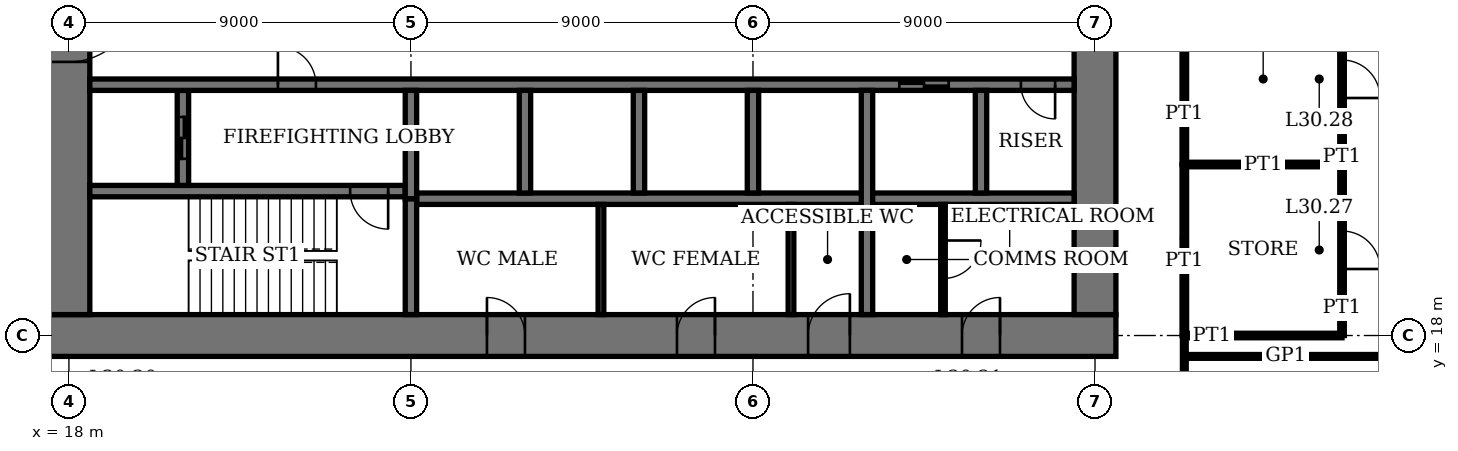
"""IFC4 building model, lengths in metres.
Left out: names, types, materials, properties, quantities, classifications, styles, units other than length and angle.
Written with IfcOpenShell. Run it as: python <this file> out.ifc"""

import sys

from ifc_helpers import new_model, si_unit, direction, frame, frame_2d, origin, place, context, subcontext, project, spatial, rectangle, extrude, element, fill, save


model = new_model("IFC4")
c1 = context("Model", 3, precision=1e-05, world=origin(), true_north=direction((0.0, 1.0)))
c2 = subcontext(c1, "Body", "Model", "MODEL_VIEW")
j1 = project(units=[si_unit("LENGTHUNIT", "METRE"), si_unit("PLANEANGLEUNIT", "RADIAN")], contexts=[c1])
p1 = place(None, origin())
s1 = spatial("IfcSite", under=j1, at=p1, CompositionType="ELEMENT")
p2 = place(p1, origin())
s2 = spatial("IfcBuilding", under=s1, at=p2, CompositionType="ELEMENT")
p3 = place(p2, frame((0.0, 0.0, 125.0)))
s3 = spatial("IfcBuildingStorey", under=s2, at=p3, CompositionType="ELEMENT", Elevation=125.0)
p4 = place(p3, frame((17.45, 18.0, 0.0), z_axis=(0.0, 0.0, 1.0), x_axis=(1.0, 0.0, 0.0)))
e1 = element("IfcWall", 1, at=p4, inside=s3, PredefinedType="SHEAR", context=c2, shape_type="SweptSolid", body=[
    extrude(rectangle(XDim=28.1, YDim=1.1, at=frame_2d((14.05, 0.0))), origin(), (0.0, 0.0, 1.0), 4.0),
])
p5 = place(p4, frame((11.55, 0.0, 0.0)))
e2 = element("IfcOpeningElement", 2, at=p5, cuts=e1, PredefinedType="OPENING", context=c2, shape_type="SweptSolid", body=[
    extrude(rectangle(XDim=1.0, YDim=2.4, at=frame_2d((0.5, 1.2))), frame((0.0, 0.56, 0.0), z_axis=(0.0, -1.0, 0.0), x_axis=(1.0, 0.0, 0.0)), (0.0, 0.0, 1.0), 1.12),
])
p6 = place(p4, frame((16.55, 0.0, 0.0)))
e3 = element("IfcOpeningElement", 3, at=p6, cuts=e1, PredefinedType="OPENING", context=c2, shape_type="SweptSolid", body=[
    extrude(rectangle(XDim=1.0, YDim=2.4, at=frame_2d((0.5, 1.2))), frame((0.0, 0.56, 0.0), z_axis=(0.0, -1.0, 0.0), x_axis=(1.0, 0.0, 0.0)), (0.0, 0.0, 1.0), 1.12),
])
p7 = place(p4, frame((20.0, 0.0, 0.0)))
e4 = element("IfcOpeningElement", 4, at=p7, cuts=e1, PredefinedType="OPENING", context=c2, shape_type="SweptSolid", body=[
    extrude(rectangle(XDim=1.1, YDim=2.4, at=frame_2d((0.55, 1.2))), frame((0.0, 0.56, 0.0), z_axis=(0.0, -1.0, 0.0), x_axis=(1.0, 0.0, 0.0)), (0.0, 0.0, 1.0), 1.12),
])
p8 = place(p4, frame((24.05, 0.0, 0.0)))
e5 = element("IfcOpeningElement", 5, at=p8, cuts=e1, PredefinedType="OPENING", context=c2, shape_type="SweptSolid", body=[
    extrude(rectangle(XDim=1.0, YDim=2.4, at=frame_2d((0.5, 1.2))), frame((0.0, 0.56, 0.0), z_axis=(0.0, -1.0, 0.0), x_axis=(1.0, 0.0, 0.0)), (0.0, 0.0, 1.0), 1.12),
])
p9 = place(p3, frame((18.0, 35.45, 0.0), z_axis=(0.0, 0.0, 1.0), x_axis=(0.0, -1.0, 0.0)))
e6 = element("IfcWall", 6, at=p9, inside=s3, PredefinedType="SHEAR", context=c2, shape_type="SweptSolid", body=[
    extrude(rectangle(XDim=16.9, YDim=1.1, at=frame_2d((8.45, 0.0))), origin(), (0.0, 0.0, 1.0), 4.0),
])
p10 = place(p9, frame((8.45, 0.0, 0.0)))
e7 = element("IfcOpeningElement", 7, at=p10, cuts=e6, PredefinedType="OPENING", context=c2, shape_type="SweptSolid", body=[
    extrude(rectangle(XDim=1.8, YDim=2.4, at=frame_2d((0.9, 1.2))), frame((0.0, 0.56, 0.0), z_axis=(0.0, -1.0, 0.0), x_axis=(1.0, 0.0, 0.0)), (0.0, 0.0, 1.0), 1.12),
])
p11 = place(p3, frame((45.0, 18.55, 0.0), z_axis=(0.0, 0.0, 1.0), x_axis=(0.0, 1.0, 0.0)))
e8 = element("IfcWall", 8, at=p11, inside=s3, PredefinedType="SHEAR", context=c2, shape_type="SweptSolid", body=[
    extrude(rectangle(XDim=16.9, YDim=1.1, at=frame_2d((8.45, 0.0))), origin(), (0.0, 0.0, 1.0), 4.0),
])
p12 = place(p11, frame((8.45, 0.0, 0.0)))
e9 = element("IfcOpeningElement", 9, at=p12, cuts=e8, PredefinedType="OPENING", context=c2, shape_type="SweptSolid", body=[
    extrude(rectangle(XDim=1.8, YDim=2.4, at=frame_2d((0.9, 1.2))), frame((0.0, 0.56, 0.0), z_axis=(0.0, -1.0, 0.0), x_axis=(1.0, 0.0, 0.0)), (0.0, 0.0, 1.0), 1.12),
])
p13 = place(p3, frame((18.55, 21.8, 0.0), z_axis=(0.0, 0.0, 1.0), x_axis=(1.0, 0.0, 0.0)))
e10 = element("IfcWall", 10, at=p13, inside=s3, PredefinedType="SHEAR", context=c2, shape_type="SweptSolid", body=[
    extrude(rectangle(XDim=8.3, YDim=0.3, at=frame_2d((4.15, 0.0))), origin(), (0.0, 0.0, 1.0), 4.0),
])
p14 = place(p13, frame((6.85, 0.0, 0.0)))
e11 = element("IfcOpeningElement", 11, at=p14, cuts=e10, PredefinedType="OPENING", context=c2, shape_type="SweptSolid", body=[
    extrude(rectangle(XDim=1.0, YDim=2.4, at=frame_2d((0.5, 1.2))), frame((0.0, 0.16, 0.0), z_axis=(0.0, -1.0, 0.0), x_axis=(1.0, 0.0, 0.0)), (0.0, 0.0, 1.0), 0.32),
])
p15 = place(p3, frame((27.0, 18.55, 0.0), z_axis=(0.0, 0.0, 1.0), x_axis=(0.0, 1.0, 0.0)))
e12 = element("IfcWall", 12, at=p15, inside=s3, PredefinedType="SHEAR", context=c2, shape_type="SweptSolid", body=[
    extrude(rectangle(XDim=3.05, YDim=0.3, at=frame_2d((1.525, 0.0))), origin(), (0.0, 0.0, 1.0), 4.0),
])
p16 = place(p3, frame((21.0, 21.95, 0.0), z_axis=(0.0, 0.0, 1.0), x_axis=(0.0, 1.0, 0.0)))
e13 = element("IfcWall", 13, at=p16, inside=s3, PredefinedType="SHEAR", context=c2, shape_type="SweptSolid", body=[
    extrude(rectangle(XDim=2.5, YDim=0.3, at=frame_2d((1.25, 0.0))), origin(), (0.0, 0.0, 1.0), 4.0),
])
p17 = place(p16, frame((0.7, 0.0, 0.0)))
e14 = element("IfcOpeningElement", 14, at=p17, cuts=e13, PredefinedType="OPENING", context=c2, shape_type="SweptSolid", body=[
    extrude(rectangle(XDim=1.1, YDim=2.4, at=frame_2d((0.55, 1.2))), frame((0.0, 0.16, 0.0), z_axis=(0.0, -1.0, 0.0), x_axis=(1.0, 0.0, 0.0)), (0.0, 0.0, 1.0), 0.32),
])
p18 = place(p3, frame((18.55, 24.6, 0.0), z_axis=(0.0, 0.0, 1.0), x_axis=(1.0, 0.0, 0.0)))
e15 = element("IfcWall", 15, at=p18, inside=s3, PredefinedType="SHEAR", context=c2, shape_type="SweptSolid", body=[
    extrude(rectangle(XDim=25.9, YDim=0.3, at=frame_2d((12.95, 0.0))), origin(), (0.0, 0.0, 1.0), 4.0),
])
p19 = place(p18, frame((4.95, 0.0, 0.0)))
e16 = element("IfcOpeningElement", 16, at=p19, cuts=e15, PredefinedType="OPENING", context=c2, shape_type="SweptSolid", body=[
    extrude(rectangle(XDim=1.0, YDim=2.4, at=frame_2d((0.5, 1.2))), frame((0.0, 0.16, 0.0), z_axis=(0.0, -1.0, 0.0), x_axis=(1.0, 0.0, 0.0)), (0.0, 0.0, 1.0), 0.32),
])
p20 = place(p18, frame((24.5, 0.0, 0.0)))
e17 = element("IfcOpeningElement", 17, at=p20, cuts=e15, PredefinedType="OPENING", context=c2, shape_type="SweptSolid", body=[
    extrude(rectangle(XDim=0.9, YDim=2.1, at=frame_2d((0.45, 1.05))), frame((0.0, 0.16, 0.0), z_axis=(0.0, -1.0, 0.0), x_axis=(1.0, 0.0, 0.0)), (0.0, 0.0, 1.0), 0.32),
])
p21 = place(p18, frame((21.3, 0.0, 0.0)))
e18 = element("IfcOpeningElement", 18, at=p21, cuts=e15, PredefinedType="OPENING", context=c2, shape_type="SweptSolid", body=[
    extrude(rectangle(XDim=1.3, YDim=2.4, at=frame_2d((0.65, 1.2))), frame((0.0, 0.16, 0.0), z_axis=(0.0, -1.0, 0.0), x_axis=(1.0, 0.0, 0.0)), (0.0, 0.0, 1.0), 0.32),
])
p22 = place(p3, frame((27.15, 21.6, 0.0), z_axis=(0.0, 0.0, 1.0), x_axis=(1.0, 0.0, 0.0)))
e19 = element("IfcWall", 19, at=p22, inside=s3, PredefinedType="SHEAR", context=c2, shape_type="SweptSolid", body=[
    extrude(rectangle(XDim=17.3, YDim=0.3, at=frame_2d((8.65, 0.0))), origin(), (0.0, 0.0, 1.0), 4.0),
])
for number, where, z_axis, x_axis in (
    (20, (30.0, 21.75, 0.0), (0.0, 0.0, 1.0), (0.0, 1.0, 0.0)),
    (21, (33.0, 21.75, 0.0), (0.0, 0.0, 1.0), (0.0, 1.0, 0.0)),
    (22, (36.0, 21.75, 0.0), (0.0, 0.0, 1.0), (0.0, 1.0, 0.0)),
):
    element("IfcWall", number, at=place(p3, frame(where, z_axis=z_axis, x_axis=x_axis)), inside=s3, PredefinedType="SHEAR", context=c2, shape_type="SweptSolid", body=[
        extrude(rectangle(XDim=2.7, YDim=0.3, at=frame_2d((1.35, 0.0))), origin(), (0.0, 0.0, 1.0), 4.0),
    ])
p23 = place(p3, frame((39.0, 18.55, 0.0), z_axis=(0.0, 0.0, 1.0), x_axis=(0.0, 1.0, 0.0)))
e23 = element("IfcWall", 23, at=p23, inside=s3, PredefinedType="SHEAR", context=c2, shape_type="SweptSolid", body=[
    extrude(rectangle(XDim=5.9, YDim=0.3, at=frame_2d((2.95, 0.0))), origin(), (0.0, 0.0, 1.0), 4.0),
])
p24 = place(p3, frame((42.0, 21.75, 0.0), z_axis=(0.0, 0.0, 1.0), x_axis=(0.0, 1.0, 0.0)))
e24 = element("IfcWall", 24, at=p24, inside=s3, PredefinedType="SHEAR", context=c2, shape_type="SweptSolid", body=[
    extrude(rectangle(XDim=2.7, YDim=0.3, at=frame_2d((1.35, 0.0))), origin(), (0.0, 0.0, 1.0), 4.0),
])
p25 = place(p3, frame((27.0, 21.6, 0.0), z_axis=(0.0, 0.0, 1.0), x_axis=(0.0, 1.0, 0.0)))
e25 = element("IfcWall", 25, at=p25, inside=s3, PredefinedType="SHEAR", context=c2, shape_type="SweptSolid", body=[
    extrude(rectangle(XDim=2.85, YDim=0.3, at=frame_2d((1.425, 0.0))), origin(), (0.0, 0.0, 1.0), 4.0),
])
p26 = place(p3, frame((47.35, 17.45, 0.0), z_axis=(0.0, 0.0, 1.0), x_axis=(1.0, 0.0, 0.0)))
e26 = element("IfcWall", 26, at=p26, inside=s3, PredefinedType="PARTITIONING", context=c2, shape_type="SweptSolid", body=[
    extrude(rectangle(XDim=5.75, YDim=0.1, at=frame_2d((2.875, 0.0))), origin(), (0.0, 0.0, 1.0), 3.75),
])
p27 = place(p3, frame((47.35, 18.0, 0.0), z_axis=(0.0, 0.0, 1.0), x_axis=(1.0, 0.0, 0.0)))
e27 = element("IfcWall", 27, at=p27, inside=s3, PredefinedType="PARTITIONING", context=c2, shape_type="SweptSolid", body=[
    extrude(rectangle(XDim=4.15, YDim=0.12, at=frame_2d((2.075, 0.0))), origin(), (0.0, 0.0, 1.0), 3.05),
])
p28 = place(p3, frame((47.35, 22.5, 0.0), z_axis=(0.0, 0.0, 1.0), x_axis=(1.0, 0.0, 0.0)))
e28 = element("IfcWall", 28, at=p28, inside=s3, PredefinedType="PARTITIONING", context=c2, shape_type="SweptSolid", body=[
    extrude(rectangle(XDim=4.15, YDim=0.12, at=frame_2d((2.075, 0.0))), origin(), (0.0, 0.0, 1.0), 3.1),
])
for number, where, z_axis, x_axis in (
    (29, (47.35, 18.0, 0.0), (0.0, 0.0, 1.0), (0.0, 1.0, 0.0)),
    (30, (47.35, 22.5, 0.0), (0.0, 0.0, 1.0), (0.0, 1.0, 0.0)),
):
    element("IfcWall", number, at=place(p3, frame(where, z_axis=z_axis, x_axis=x_axis)), inside=s3, PredefinedType="PARTITIONING", context=c2, shape_type="SweptSolid", body=[
        extrude(rectangle(XDim=4.5, YDim=0.12, at=frame_2d((2.25, 0.0))), origin(), (0.0, 0.0, 1.0), 3.75),
    ])
p29 = place(p3, frame((47.35, 15.65, 0.0), z_axis=(0.0, 0.0, 1.0), x_axis=(0.0, 1.0, 0.0)))
e31 = element("IfcWall", 31, at=p29, inside=s3, PredefinedType="PARTITIONING", context=c2, shape_type="SweptSolid", body=[
    extrude(rectangle(XDim=2.35, YDim=0.1, at=frame_2d((1.175, 0.0))), origin(), (0.0, 0.0, 1.0), 3.75),
])
p30 = place(p3, frame((51.5, 18.0, 0.0), z_axis=(0.0, 0.0, 1.0), x_axis=(0.0, 1.0, 0.0)))
e32 = element("IfcWall", 32, at=p30, inside=s3, PredefinedType="PARTITIONING", context=c2, shape_type="SweptSolid", body=[
    extrude(rectangle(XDim=4.5, YDim=0.12, at=frame_2d((2.25, 0.0))), origin(), (0.0, 0.0, 1.0), 3.75),
])
p31 = place(p30, frame((1.75, 0.0, 0.0)))
e33 = element("IfcOpeningElement", 33, at=p31, cuts=e32, PredefinedType="OPENING", context=c2, shape_type="SweptSolid", body=[
    extrude(rectangle(XDim=1.0, YDim=2.4, at=frame_2d((0.5, 1.2))), frame((0.0, 0.07, 0.0), z_axis=(0.0, -1.0, 0.0), x_axis=(1.0, 0.0, 0.0)), (0.0, 0.0, 1.0), 0.14),
])
p32 = place(p3, frame((51.5, 22.5, 0.0), z_axis=(0.0, 0.0, 1.0), x_axis=(0.0, 1.0, 0.0)))
e34 = element("IfcWall", 34, at=p32, inside=s3, PredefinedType="PARTITIONING", context=c2, shape_type="SweptSolid", body=[
    extrude(rectangle(XDim=4.5, YDim=0.12, at=frame_2d((2.25, 0.0))), origin(), (0.0, 0.0, 1.0), 3.75),
])
p33 = place(p32, frame((1.75, 0.0, 0.0)))
e35 = element("IfcOpeningElement", 35, at=p33, cuts=e34, PredefinedType="OPENING", context=c2, shape_type="SweptSolid", body=[
    extrude(rectangle(XDim=1.0, YDim=2.4, at=frame_2d((0.5, 1.2))), frame((0.0, 0.07, 0.0), z_axis=(0.0, -1.0, 0.0), x_axis=(1.0, 0.0, 0.0)), (0.0, 0.0, 1.0), 0.14),
])
for number, where, z_axis, x_axis in (
    (36, (32.0, 18.55, 0.0), (0.0, 0.0, 1.0), (0.0, 1.0, 0.0)),
    (37, (37.0, 18.55, 0.0), (0.0, 0.0, 1.0), (0.0, 1.0, 0.0)),
):
    element("IfcWall", number, at=place(p3, frame(where, z_axis=z_axis, x_axis=x_axis)), inside=s3, PredefinedType="PARTITIONING", context=c2, shape_type="SweptSolid", body=[
        extrude(rectangle(XDim=2.9, YDim=0.15, at=frame_2d((1.45, 0.0))), origin(), (0.0, 0.0, 1.0), 3.75),
    ])
p34 = place(p3, frame((41.0, 18.55, 0.0), z_axis=(0.0, 0.0, 1.0), x_axis=(0.0, 1.0, 0.0)))
e38 = element("IfcWall", 38, at=p34, inside=s3, PredefinedType="PARTITIONING", context=c2, shape_type="SweptSolid", body=[
    extrude(rectangle(XDim=2.9, YDim=0.12, at=frame_2d((1.45, 0.0))), origin(), (0.0, 0.0, 1.0), 3.75),
])
p35 = place(p34, frame((0.95, 0.0, 0.0)))
e39 = element("IfcOpeningElement", 39, at=p35, cuts=e38, PredefinedType="OPENING", context=c2, shape_type="SweptSolid", body=[
    extrude(rectangle(XDim=1.0, YDim=2.4, at=frame_2d((0.5, 1.2))), frame((0.0, 0.07, 0.0), z_axis=(0.0, -1.0, 0.0), x_axis=(1.0, 0.0, 0.0)), (0.0, 0.0, 1.0), 0.14),
])
p36 = place(p10, origin())
e40 = element("IfcDoor", 40, at=p36, inside=s3, OperationType="DOUBLE_DOOR_DOUBLE_SWING", PredefinedType="DOOR", context=c2, shape_type="SweptSolid", body=[
    extrude(rectangle(XDim=1.8, YDim=2.4, at=frame_2d((0.9, 1.2))), frame((0.0, 0.03, 0.0), z_axis=(0.0, -1.0, 0.0), x_axis=(1.0, 0.0, 0.0)), (0.0, 0.0, 1.0), 0.06),
    extrude(rectangle(XDim=0.04, YDim=2.4, at=frame_2d((0.02, 1.2))), frame((0.0, 0.55, 0.0), z_axis=(0.0, -1.0, 0.0), x_axis=(1.0, 0.0, 0.0)), (0.0, 0.0, 1.0), 1.1),
    extrude(rectangle(XDim=0.04, YDim=2.4, at=frame_2d((1.78, 1.2))), frame((0.0, 0.55, 0.0), z_axis=(0.0, -1.0, 0.0), x_axis=(1.0, 0.0, 0.0)), (0.0, 0.0, 1.0), 1.1),
    extrude(rectangle(XDim=1.8, YDim=0.04, at=frame_2d((0.9, 2.38))), frame((0.0, 0.55, 0.0), z_axis=(0.0, -1.0, 0.0), x_axis=(1.0, 0.0, 0.0)), (0.0, 0.0, 1.0), 1.1),
])
fill(e7, e40)
p37 = place(p5, origin())
e41 = element("IfcDoor", 41, at=p37, inside=s3, OperationType="SINGLE_SWING_RIGHT", PredefinedType="DOOR", context=c2, shape_type="SweptSolid", body=[
    extrude(rectangle(XDim=1.0, YDim=2.4, at=frame_2d((0.5, 1.2))), frame((0.0, 0.025, 0.0), z_axis=(0.0, -1.0, 0.0), x_axis=(1.0, 0.0, 0.0)), (0.0, 0.0, 1.0), 0.05),
    extrude(rectangle(XDim=0.04, YDim=2.4, at=frame_2d((0.02, 1.2))), frame((0.0, 0.4, 0.0), z_axis=(0.0, -1.0, 0.0), x_axis=(1.0, 0.0, 0.0)), (0.0, 0.0, 1.0), 0.8),
    extrude(rectangle(XDim=0.04, YDim=2.4, at=frame_2d((0.98, 1.2))), frame((0.0, 0.4, 0.0), z_axis=(0.0, -1.0, 0.0), x_axis=(1.0, 0.0, 0.0)), (0.0, 0.0, 1.0), 0.8),
    extrude(rectangle(XDim=1.0, YDim=0.04, at=frame_2d((0.5, 2.38))), frame((0.0, 0.4, 0.0), z_axis=(0.0, -1.0, 0.0), x_axis=(1.0, 0.0, 0.0)), (0.0, 0.0, 1.0), 0.8),
])
fill(e2, e41)
p38 = place(p6, origin())
e42 = element("IfcDoor", 42, at=p38, inside=s3, OperationType="SINGLE_SWING_LEFT", PredefinedType="DOOR", context=c2, shape_type="SweptSolid", body=[
    extrude(rectangle(XDim=1.0, YDim=2.4, at=frame_2d((0.5, 1.2))), frame((0.0, 0.025, 0.0), z_axis=(0.0, -1.0, 0.0), x_axis=(1.0, 0.0, 0.0)), (0.0, 0.0, 1.0), 0.05),
    extrude(rectangle(XDim=0.04, YDim=2.4, at=frame_2d((0.02, 1.2))), frame((0.0, 0.4, 0.0), z_axis=(0.0, -1.0, 0.0), x_axis=(1.0, 0.0, 0.0)), (0.0, 0.0, 1.0), 0.8),
    extrude(rectangle(XDim=0.04, YDim=2.4, at=frame_2d((0.98, 1.2))), frame((0.0, 0.4, 0.0), z_axis=(0.0, -1.0, 0.0), x_axis=(1.0, 0.0, 0.0)), (0.0, 0.0, 1.0), 0.8),
    extrude(rectangle(XDim=1.0, YDim=0.04, at=frame_2d((0.5, 2.38))), frame((0.0, 0.4, 0.0), z_axis=(0.0, -1.0, 0.0), x_axis=(1.0, 0.0, 0.0)), (0.0, 0.0, 1.0), 0.8),
])
fill(e3, e42)
p39 = place(p7, origin())
e43 = element("IfcDoor", 43, at=p39, inside=s3, OperationType="SINGLE_SWING_LEFT", PredefinedType="DOOR", context=c2, shape_type="SweptSolid", body=[
    extrude(rectangle(XDim=1.1, YDim=2.4, at=frame_2d((0.55, 1.2))), frame((0.0, 0.025, 0.0), z_axis=(0.0, -1.0, 0.0), x_axis=(1.0, 0.0, 0.0)), (0.0, 0.0, 1.0), 0.05),
    extrude(rectangle(XDim=0.04, YDim=2.4, at=frame_2d((0.02, 1.2))), frame((0.0, 0.44, 0.0), z_axis=(0.0, -1.0, 0.0), x_axis=(1.0, 0.0, 0.0)), (0.0, 0.0, 1.0), 0.88),
    extrude(rectangle(XDim=0.04, YDim=2.4, at=frame_2d((1.08, 1.2))), frame((0.0, 0.44, 0.0), z_axis=(0.0, -1.0, 0.0), x_axis=(1.0, 0.0, 0.0)), (0.0, 0.0, 1.0), 0.88),
    extrude(rectangle(XDim=1.1, YDim=0.04, at=frame_2d((0.55, 2.38))), frame((0.0, 0.44, 0.0), z_axis=(0.0, -1.0, 0.0), x_axis=(1.0, 0.0, 0.0)), (0.0, 0.0, 1.0), 0.88),
])
fill(e4, e43)
p40 = place(p8, origin())
e44 = element("IfcDoor", 44, at=p40, inside=s3, OperationType="SINGLE_SWING_LEFT", PredefinedType="DOOR", context=c2, shape_type="SweptSolid", body=[
    extrude(rectangle(XDim=1.0, YDim=2.4, at=frame_2d((0.5, 1.2))), frame((0.0, 0.025, 0.0), z_axis=(0.0, -1.0, 0.0), x_axis=(1.0, 0.0, 0.0)), (0.0, 0.0, 1.0), 0.05),
    extrude(rectangle(XDim=0.04, YDim=2.4, at=frame_2d((0.02, 1.2))), frame((0.0, 0.4, 0.0), z_axis=(0.0, -1.0, 0.0), x_axis=(1.0, 0.0, 0.0)), (0.0, 0.0, 1.0), 0.8),
    extrude(rectangle(XDim=0.04, YDim=2.4, at=frame_2d((0.98, 1.2))), frame((0.0, 0.4, 0.0), z_axis=(0.0, -1.0, 0.0), x_axis=(1.0, 0.0, 0.0)), (0.0, 0.0, 1.0), 0.8),
    extrude(rectangle(XDim=1.0, YDim=0.04, at=frame_2d((0.5, 2.38))), frame((0.0, 0.4, 0.0), z_axis=(0.0, -1.0, 0.0), x_axis=(1.0, 0.0, 0.0)), (0.0, 0.0, 1.0), 0.8),
])
fill(e5, e44)
p41 = place(p14, origin())
e45 = element("IfcDoor", 45, at=p41, inside=s3, OperationType="SINGLE_SWING_RIGHT", PredefinedType="DOOR", context=c2, shape_type="SweptSolid", body=[
    extrude(rectangle(XDim=1.0, YDim=2.4, at=frame_2d((0.5, 1.2))), frame((0.0, 0.03, 0.0), z_axis=(0.0, -1.0, 0.0), x_axis=(1.0, 0.0, 0.0)), (0.0, 0.0, 1.0), 0.06),
])
fill(e11, e45)
p42 = place(p19, origin())
e46 = element("IfcDoor", 46, at=p42, inside=s3, OperationType="SINGLE_SWING_RIGHT", PredefinedType="DOOR", context=c2, shape_type="SweptSolid", body=[
    extrude(rectangle(XDim=1.0, YDim=2.4, at=frame_2d((0.5, 1.2))), frame((0.0, 0.03, 0.0), z_axis=(0.0, -1.0, 0.0), x_axis=(1.0, 0.0, 0.0)), (0.0, 0.0, 1.0), 0.06),
])
fill(e16, e46)
p43 = place(p20, origin())
e47 = element("IfcDoor", 47, at=p43, inside=s3, OperationType="SINGLE_SWING_RIGHT", PredefinedType="DOOR", context=c2, shape_type="SweptSolid", body=[
    extrude(rectangle(XDim=0.9, YDim=2.1, at=frame_2d((0.45, 1.05))), frame((0.0, 0.03, 0.0), z_axis=(0.0, -1.0, 0.0), x_axis=(1.0, 0.0, 0.0)), (0.0, 0.0, 1.0), 0.06),
])
fill(e17, e47)
p44 = place(p31, origin())
e48 = element("IfcDoor", 48, at=p44, inside=s3, OperationType="SINGLE_SWING_LEFT", PredefinedType="DOOR", context=c2, shape_type="SweptSolid", body=[
    extrude(rectangle(XDim=1.0, YDim=2.4, at=frame_2d((0.5, 1.2))), frame((0.0, 0.025, 0.0), z_axis=(0.0, -1.0, 0.0), x_axis=(1.0, 0.0, 0.0)), (0.0, 0.0, 1.0), 0.05),
])
fill(e33, e48)
p45 = place(p33, origin())
e49 = element("IfcDoor", 49, at=p45, inside=s3, OperationType="SINGLE_SWING_LEFT", PredefinedType="DOOR", context=c2, shape_type="SweptSolid", body=[
    extrude(rectangle(XDim=1.0, YDim=2.4, at=frame_2d((0.5, 1.2))), frame((0.0, 0.025, 0.0), z_axis=(0.0, -1.0, 0.0), x_axis=(1.0, 0.0, 0.0)), (0.0, 0.0, 1.0), 0.05),
])
fill(e35, e49)
p46 = place(p35, origin())
e50 = element("IfcDoor", 50, at=p46, inside=s3, OperationType="SINGLE_SWING_RIGHT", PredefinedType="DOOR", context=c2, shape_type="SweptSolid", body=[
    extrude(rectangle(XDim=1.0, YDim=2.4, at=frame_2d((0.5, 1.2))), frame((0.0, 0.03, 0.0), z_axis=(0.0, -1.0, 0.0), x_axis=(1.0, 0.0, 0.0)), (0.0, 0.0, 1.0), 0.06),
])
fill(e39, e50)
p47 = place(p21, origin())
e51 = element("IfcDoor", 51, at=p47, inside=s3, OperationType="DOUBLE_DOOR_SLIDING", PredefinedType="DOOR", context=c2, shape_type="SweptSolid", body=[
    extrude(rectangle(XDim=1.3, YDim=2.4, at=frame_2d((0.65, 1.2))), frame((0.0, 0.02, 0.0), z_axis=(0.0, -1.0, 0.0), x_axis=(1.0, 0.0, 0.0)), (0.0, 0.0, 1.0), 0.04),
])
fill(e18, e51)
p48 = place(p17, origin())
e52 = element("IfcDoor", 52, at=p48, inside=s3, OperationType="DOUBLE_DOOR_SLIDING", PredefinedType="DOOR", context=c2, shape_type="SweptSolid", body=[
    extrude(rectangle(XDim=1.1, YDim=2.4, at=frame_2d((0.55, 1.2))), frame((0.0, 0.03, 0.0), z_axis=(0.0, -1.0, 0.0), x_axis=(1.0, 0.0, 0.0)), (0.0, 0.0, 1.0), 0.06),
])
fill(e14, e52)
save(model, sys.argv[1])
